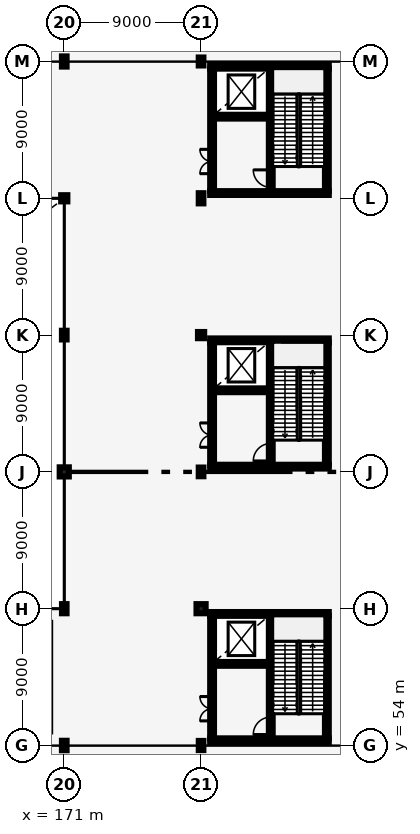
"""IFC4 building model, lengths in metres.
Left out: names, types, materials, properties, quantities, classifications, styles, units other than length and angle.
Written with IfcOpenShell. Run it as: python <this file> out.ifc"""

import sys

from ifc_helpers import new_model, si_unit, direction, frame, frame_2d, origin, origin_2d, place, context, subcontext, project, spatial, rectangle, hollow_circle, i_section, extrude, element, fill, save


model = new_model("IFC4")
c1 = context("Model", 3, precision=1e-05, world=origin(), true_north=direction((0.0, 1.0)))
c2 = subcontext(c1, "Body", "Model", "MODEL_VIEW")
j1 = project(units=[si_unit("LENGTHUNIT", "METRE"), si_unit("PLANEANGLEUNIT", "RADIAN")], contexts=[c1])
p1 = place(None, origin())
s1 = spatial("IfcSite", under=j1, at=p1, CompositionType="ELEMENT")
p2 = place(p1, origin())
s2 = spatial("IfcBuilding", under=s1, at=p2, CompositionType="ELEMENT")
p3 = place(p2, frame((0.0, 0.0, 6.0)))
s3 = spatial("IfcBuildingStorey", under=s2, at=p3, CompositionType="ELEMENT", Elevation=6.0)
p4 = place(p3, frame((171.0, 54.0, 0.0), z_axis=(0.0, 0.0, 1.0), x_axis=(1.0, 0.0, 0.0)))
e1 = element("IfcColumn", 1, at=p4, inside=s3, PredefinedType="COLUMN", context=c2, shape_type="SweptSolid", body=[
    extrude(i_section(OverallWidth=0.305, OverallDepth=0.62, WebThickness=0.021, FlangeThickness=0.04, FilletRadius=0.027, at=origin_2d()), origin(), (0.0, 0.0, 1.0), 6.0),
])
p5 = place(p3, frame((171.0, 63.0, 0.0), z_axis=(0.0, 0.0, 1.0), x_axis=(1.0, 0.0, 0.0)))
e2 = element("IfcColumn", 2, at=p5, inside=s3, PredefinedType="COLUMN", context=c2, shape_type="SweptSolid", body=[
    extrude(i_section(OverallWidth=0.3, OverallDepth=0.6, WebThickness=0.015, FlangeThickness=0.03, FilletRadius=0.027, at=origin_2d()), origin(), (0.0, 0.0, 1.0), 6.0),
])
p6 = place(p3, frame((171.0, 72.0, 0.0), z_axis=(0.0, 0.0, 1.0), x_axis=(1.0, 0.0, 0.0)))
e3 = element("IfcColumn", 3, at=p6, inside=s3, PredefinedType="COLUMN", context=c2, shape_type="SweptSolid", body=[
    extrude(rectangle(XDim=0.6, YDim=0.6, at=origin_2d()), origin(), (0.0, 0.0, 1.0), 6.0),
])
p7 = place(p3, frame((171.0, 81.0, 0.0), z_axis=(0.0, 0.0, 1.0), x_axis=(1.0, 0.0, 0.0)))
e4 = element("IfcColumn", 4, at=p7, inside=s3, PredefinedType="COLUMN", context=c2, shape_type="SweptSolid", body=[
    extrude(i_section(OverallWidth=0.306, OverallDepth=0.572, WebThickness=0.021, FlangeThickness=0.04, FilletRadius=0.027, at=origin_2d()), origin(), (0.0, 0.0, 1.0), 6.0),
])
p8 = place(p3, frame((171.0, 90.0, 0.0), z_axis=(0.0, 0.0, 1.0), x_axis=(1.0, 0.0, 0.0)))
e5 = element("IfcColumn", 5, at=p8, inside=s3, PredefinedType="COLUMN", context=c2, shape_type="SweptSolid", body=[
    extrude(hollow_circle(Radius=0.203, WallThickness=0.016, at=origin_2d()), origin(), (0.0, 0.0, 1.0), 6.0),
])
p9 = place(p3, frame((171.0, 99.0, 0.0), z_axis=(0.0, 0.0, 1.0), x_axis=(1.0, 0.0, 0.0)))
e6 = element("IfcColumn", 6, at=p9, inside=s3, PredefinedType="COLUMN", context=c2, shape_type="SweptSolid", body=[
    extrude(i_section(OverallWidth=0.305, OverallDepth=0.668, WebThickness=0.021, FlangeThickness=0.04, FilletRadius=0.027, at=origin_2d()), origin(), (0.0, 0.0, 1.0), 6.0),
])
p10 = place(p3, frame((180.0, 54.0, 0.0), z_axis=(0.0, 0.0, 1.0), x_axis=(1.0, 0.0, 0.0)))
e7 = element("IfcColumn", 7, at=p10, inside=s3, PredefinedType="COLUMN", context=c2, shape_type="SweptSolid", body=[
    extrude(i_section(OverallWidth=0.3, OverallDepth=0.6, WebThickness=0.015, FlangeThickness=0.03, FilletRadius=0.027, at=origin_2d()), origin(), (0.0, 0.0, 1.0), 6.0),
])
p11 = place(p3, frame((180.0, 63.0, 0.0), z_axis=(0.0, 0.0, 1.0), x_axis=(1.0, 0.0, 0.0)))
e8 = element("IfcColumn", 8, at=p11, inside=s3, PredefinedType="COLUMN", context=c2, shape_type="SweptSolid", body=[
    extrude(rectangle(XDim=0.6, YDim=0.6, at=origin_2d()), origin(), (0.0, 0.0, 1.0), 6.0),
])
p12 = place(p3, frame((180.0, 72.0, 0.0), z_axis=(0.0, 0.0, 1.0), x_axis=(1.0, 0.0, 0.0)))
e9 = element("IfcColumn", 9, at=p12, inside=s3, PredefinedType="COLUMN", context=c2, shape_type="SweptSolid", body=[
    extrude(i_section(OverallWidth=0.306, OverallDepth=0.572, WebThickness=0.021, FlangeThickness=0.04, FilletRadius=0.027, at=origin_2d()), origin(), (0.0, 0.0, 1.0), 6.0),
])
p13 = place(p3, frame((180.0, 81.0, 0.0), z_axis=(0.0, 0.0, 1.0), x_axis=(1.0, 0.0, 0.0)))
e10 = element("IfcColumn", 10, at=p13, inside=s3, PredefinedType="COLUMN", context=c2, shape_type="SweptSolid", body=[
    extrude(hollow_circle(Radius=0.203, WallThickness=0.016, at=origin_2d()), origin(), (0.0, 0.0, 1.0), 6.0),
])
p14 = place(p3, frame((180.0, 90.0, 0.0), z_axis=(0.0, 0.0, 1.0), x_axis=(1.0, 0.0, 0.0)))
e11 = element("IfcColumn", 11, at=p14, inside=s3, PredefinedType="COLUMN", context=c2, shape_type="SweptSolid", body=[
    extrude(i_section(OverallWidth=0.305, OverallDepth=0.668, WebThickness=0.021, FlangeThickness=0.04, FilletRadius=0.027, at=origin_2d()), origin(), (0.0, 0.0, 1.0), 6.0),
])
p15 = place(p3, frame((180.0, 99.0, 0.0), z_axis=(0.0, 0.0, 1.0), x_axis=(1.0, 0.0, 0.0)))
e12 = element("IfcColumn", 12, at=p15, inside=s3, PredefinedType="COLUMN", context=c2, shape_type="SweptSolid", body=[
    extrude(i_section(OverallWidth=0.306, OverallDepth=0.524, WebThickness=0.021, FlangeThickness=0.04, FilletRadius=0.027, at=origin_2d()), origin(), (0.0, 0.0, 1.0), 6.0),
])
p16 = place(p3, frame((180.725, 54.47, 0.0), z_axis=(0.0, 0.0, 1.0), x_axis=(0.0, 1.0, 0.0)))
e13 = element("IfcWall", 13, at=p16, inside=s3, PredefinedType="SHEAR", context=c2, shape_type="SweptSolid", body=[
    extrude(rectangle(XDim=8.06, YDim=0.25, at=frame_2d((4.03, 0.0))), origin(), (0.0, 0.0, 1.0), 5.64),
])
p17 = place(p16, frame((1.15, 0.0, 0.0)))
e14 = element("IfcOpeningElement", 14, at=p17, cuts=e13, PredefinedType="OPENING", context=c2, shape_type="SweptSolid", body=[
    extrude(rectangle(XDim=1.6, YDim=2.2, at=frame_2d((0.8, 1.1))), frame((0.0, 0.135, 0.0), z_axis=(0.0, -1.0, 0.0), x_axis=(1.0, 0.0, 0.0)), (0.0, 0.0, 1.0), 0.27),
])
p18 = place(p3, frame((188.275, 54.47, 0.0), z_axis=(0.0, 0.0, 1.0), x_axis=(0.0, 1.0, 0.0)))
e15 = element("IfcWall", 15, at=p18, inside=s3, PredefinedType="SHEAR", context=c2, shape_type="SweptSolid", body=[
    extrude(rectangle(XDim=8.06, YDim=0.25, at=frame_2d((4.03, 0.0))), origin(), (0.0, 0.0, 1.0), 5.64),
])
for number, where, z_axis, x_axis in (
    (16, (180.6, 54.345, 0.0), (0.0, 0.0, 1.0), (1.0, 0.0, 0.0)),
    (17, (180.6, 62.655, 0.0), (0.0, 0.0, 1.0), (1.0, 0.0, 0.0)),
):
    element("IfcWall", number, at=place(p3, frame(where, z_axis=z_axis, x_axis=x_axis)), inside=s3, PredefinedType="SHEAR", context=c2, shape_type="SweptSolid", body=[
        extrude(rectangle(XDim=7.8, YDim=0.25, at=frame_2d((3.9, 0.0))), origin(), (0.0, 0.0, 1.0), 5.64),
    ])
p19 = place(p3, frame((184.585, 54.47, 0.0), z_axis=(0.0, 0.0, 1.0), x_axis=(0.0, 1.0, 0.0)))
e18 = element("IfcWall", 18, at=p19, inside=s3, PredefinedType="SHEAR", context=c2, shape_type="SweptSolid", body=[
    extrude(rectangle(XDim=8.06, YDim=0.25, at=frame_2d((4.03, 0.0))), origin(), (0.0, 0.0, 1.0), 5.64),
])
p20 = place(p19, frame((0.25, 0.0, 0.0)))
e19 = element("IfcOpeningElement", 19, at=p20, cuts=e18, PredefinedType="OPENING", context=c2, shape_type="SweptSolid", body=[
    extrude(rectangle(XDim=1.15, YDim=2.15, at=frame_2d((0.575, 1.075))), frame((0.0, 0.135, 0.0), z_axis=(0.0, -1.0, 0.0), x_axis=(1.0, 0.0, 0.0)), (0.0, 0.0, 1.0), 0.27),
])
p21 = place(p3, frame((180.85, 59.37, 0.0), z_axis=(0.0, 0.0, 1.0), x_axis=(1.0, 0.0, 0.0)))
e20 = element("IfcWall", 20, at=p21, inside=s3, PredefinedType="SHEAR", context=c2, shape_type="SweptSolid", body=[
    extrude(rectangle(XDim=3.61, YDim=0.25, at=frame_2d((1.805, 0.0))), origin(), (0.0, 0.0, 1.0), 5.64),
])
p22 = place(p21, frame((0.95, 0.0, 0.0)))
e21 = element("IfcOpeningElement", 21, at=p22, cuts=e20, PredefinedType="OPENING", context=c2, shape_type="SweptSolid", body=[
    extrude(rectangle(XDim=1.2, YDim=2.2, at=frame_2d((0.6, 1.1))), frame((0.0, 0.135, 0.0), z_axis=(0.0, -1.0, 0.0), x_axis=(1.0, 0.0, 0.0)), (0.0, 0.0, 1.0), 0.27),
])
p23 = place(p3, frame((180.725, 72.47, 0.0), z_axis=(0.0, 0.0, 1.0), x_axis=(0.0, 1.0, 0.0)))
e22 = element("IfcWall", 22, at=p23, inside=s3, PredefinedType="SHEAR", context=c2, shape_type="SweptSolid", body=[
    extrude(rectangle(XDim=8.06, YDim=0.25, at=frame_2d((4.03, 0.0))), origin(), (0.0, 0.0, 1.0), 5.64),
])
p24 = place(p23, frame((1.15, 0.0, 0.0)))
e23 = element("IfcOpeningElement", 23, at=p24, cuts=e22, PredefinedType="OPENING", context=c2, shape_type="SweptSolid", body=[
    extrude(rectangle(XDim=1.6, YDim=2.2, at=frame_2d((0.8, 1.1))), frame((0.0, 0.135, 0.0), z_axis=(0.0, -1.0, 0.0), x_axis=(1.0, 0.0, 0.0)), (0.0, 0.0, 1.0), 0.27),
])
p25 = place(p3, frame((188.275, 72.47, 0.0), z_axis=(0.0, 0.0, 1.0), x_axis=(0.0, 1.0, 0.0)))
e24 = element("IfcWall", 24, at=p25, inside=s3, PredefinedType="SHEAR", context=c2, shape_type="SweptSolid", body=[
    extrude(rectangle(XDim=8.06, YDim=0.25, at=frame_2d((4.03, 0.0))), origin(), (0.0, 0.0, 1.0), 5.64),
])
for number, where, z_axis, x_axis in (
    (25, (180.6, 72.345, 0.0), (0.0, 0.0, 1.0), (1.0, 0.0, 0.0)),
    (26, (180.6, 80.655, 0.0), (0.0, 0.0, 1.0), (1.0, 0.0, 0.0)),
):
    element("IfcWall", number, at=place(p3, frame(where, z_axis=z_axis, x_axis=x_axis)), inside=s3, PredefinedType="SHEAR", context=c2, shape_type="SweptSolid", body=[
        extrude(rectangle(XDim=7.8, YDim=0.25, at=frame_2d((3.9, 0.0))), origin(), (0.0, 0.0, 1.0), 5.64),
    ])
p26 = place(p3, frame((184.585, 72.47, 0.0), z_axis=(0.0, 0.0, 1.0), x_axis=(0.0, 1.0, 0.0)))
e27 = element("IfcWall", 27, at=p26, inside=s3, PredefinedType="SHEAR", context=c2, shape_type="SweptSolid", body=[
    extrude(rectangle(XDim=8.06, YDim=0.25, at=frame_2d((4.03, 0.0))), origin(), (0.0, 0.0, 1.0), 5.64),
])
p27 = place(p26, frame((0.25, 0.0, 0.0)))
e28 = element("IfcOpeningElement", 28, at=p27, cuts=e27, PredefinedType="OPENING", context=c2, shape_type="SweptSolid", body=[
    extrude(rectangle(XDim=1.15, YDim=2.15, at=frame_2d((0.575, 1.075))), frame((0.0, 0.135, 0.0), z_axis=(0.0, -1.0, 0.0), x_axis=(1.0, 0.0, 0.0)), (0.0, 0.0, 1.0), 0.27),
])
p28 = place(p3, frame((180.85, 77.37, 0.0), z_axis=(0.0, 0.0, 1.0), x_axis=(1.0, 0.0, 0.0)))
e29 = element("IfcWall", 29, at=p28, inside=s3, PredefinedType="SHEAR", context=c2, shape_type="SweptSolid", body=[
    extrude(rectangle(XDim=3.61, YDim=0.25, at=frame_2d((1.805, 0.0))), origin(), (0.0, 0.0, 1.0), 5.64),
])
p29 = place(p28, frame((0.95, 0.0, 0.0)))
e30 = element("IfcOpeningElement", 30, at=p29, cuts=e29, PredefinedType="OPENING", context=c2, shape_type="SweptSolid", body=[
    extrude(rectangle(XDim=1.2, YDim=2.2, at=frame_2d((0.6, 1.1))), frame((0.0, 0.135, 0.0), z_axis=(0.0, -1.0, 0.0), x_axis=(1.0, 0.0, 0.0)), (0.0, 0.0, 1.0), 0.27),
])
p30 = place(p3, frame((180.725, 90.47, 0.0), z_axis=(0.0, 0.0, 1.0), x_axis=(0.0, 1.0, 0.0)))
e31 = element("IfcWall", 31, at=p30, inside=s3, PredefinedType="SHEAR", context=c2, shape_type="SweptSolid", body=[
    extrude(rectangle(XDim=8.06, YDim=0.25, at=frame_2d((4.03, 0.0))), origin(), (0.0, 0.0, 1.0), 5.64),
])
p31 = place(p30, frame((1.15, 0.0, 0.0)))
e32 = element("IfcOpeningElement", 32, at=p31, cuts=e31, PredefinedType="OPENING", context=c2, shape_type="SweptSolid", body=[
    extrude(rectangle(XDim=1.6, YDim=2.2, at=frame_2d((0.8, 1.1))), frame((0.0, 0.135, 0.0), z_axis=(0.0, -1.0, 0.0), x_axis=(1.0, 0.0, 0.0)), (0.0, 0.0, 1.0), 0.27),
])
p32 = place(p3, frame((188.275, 90.47, 0.0), z_axis=(0.0, 0.0, 1.0), x_axis=(0.0, 1.0, 0.0)))
e33 = element("IfcWall", 33, at=p32, inside=s3, PredefinedType="SHEAR", context=c2, shape_type="SweptSolid", body=[
    extrude(rectangle(XDim=8.06, YDim=0.25, at=frame_2d((4.03, 0.0))), origin(), (0.0, 0.0, 1.0), 5.64),
])
for number, where, z_axis, x_axis in (
    (34, (180.6, 90.345, 0.0), (0.0, 0.0, 1.0), (1.0, 0.0, 0.0)),
    (35, (180.6, 98.655, 0.0), (0.0, 0.0, 1.0), (1.0, 0.0, 0.0)),
):
    element("IfcWall", number, at=place(p3, frame(where, z_axis=z_axis, x_axis=x_axis)), inside=s3, PredefinedType="SHEAR", context=c2, shape_type="SweptSolid", body=[
        extrude(rectangle(XDim=7.8, YDim=0.25, at=frame_2d((3.9, 0.0))), origin(), (0.0, 0.0, 1.0), 5.64),
    ])
p33 = place(p3, frame((184.585, 90.47, 0.0), z_axis=(0.0, 0.0, 1.0), x_axis=(0.0, 1.0, 0.0)))
e36 = element("IfcWall", 36, at=p33, inside=s3, PredefinedType="SHEAR", context=c2, shape_type="SweptSolid", body=[
    extrude(rectangle(XDim=8.06, YDim=0.25, at=frame_2d((4.03, 0.0))), origin(), (0.0, 0.0, 1.0), 5.64),
])
p34 = place(p33, frame((0.25, 0.0, 0.0)))
e37 = element("IfcOpeningElement", 37, at=p34, cuts=e36, PredefinedType="OPENING", context=c2, shape_type="SweptSolid", body=[
    extrude(rectangle(XDim=1.15, YDim=2.15, at=frame_2d((0.575, 1.075))), frame((0.0, 0.135, 0.0), z_axis=(0.0, -1.0, 0.0), x_axis=(1.0, 0.0, 0.0)), (0.0, 0.0, 1.0), 0.27),
])
p35 = place(p3, frame((180.85, 95.37, 0.0), z_axis=(0.0, 0.0, 1.0), x_axis=(1.0, 0.0, 0.0)))
e38 = element("IfcWall", 38, at=p35, inside=s3, PredefinedType="SHEAR", context=c2, shape_type="SweptSolid", body=[
    extrude(rectangle(XDim=3.61, YDim=0.25, at=frame_2d((1.805, 0.0))), origin(), (0.0, 0.0, 1.0), 5.64),
])
p36 = place(p35, frame((0.95, 0.0, 0.0)))
e39 = element("IfcOpeningElement", 39, at=p36, cuts=e38, PredefinedType="OPENING", context=c2, shape_type="SweptSolid", body=[
    extrude(rectangle(XDim=1.2, YDim=2.2, at=frame_2d((0.6, 1.1))), frame((0.0, 0.135, 0.0), z_axis=(0.0, -1.0, 0.0), x_axis=(1.0, 0.0, 0.0)), (0.0, 0.0, 1.0), 0.27),
])
p37 = place(p20, origin())
e40 = element("IfcDoor", 40, at=p37, inside=s3, OperationType="SINGLE_SWING_LEFT", PredefinedType="DOOR", context=c2, shape_type="SweptSolid", body=[
    extrude(rectangle(XDim=1.15, YDim=2.15, at=frame_2d((0.575, 1.075))), frame((0.0, 0.025, 0.0), z_axis=(0.0, -1.0, 0.0), x_axis=(1.0, 0.0, 0.0)), (0.0, 0.0, 1.0), 0.05),
])
fill(e19, e40)
p38 = place(p22, origin())
e41 = element("IfcDoor", 41, at=p38, inside=s3, OperationType="DOUBLE_DOOR_SLIDING", PredefinedType="DOOR", context=c2, shape_type="SweptSolid", body=[
    extrude(rectangle(XDim=1.2, YDim=2.2, at=frame_2d((0.6, 1.1))), frame((0.0, 0.025, 0.0), z_axis=(0.0, -1.0, 0.0), x_axis=(1.0, 0.0, 0.0)), (0.0, 0.0, 1.0), 0.05),
])
fill(e21, e41)
p39 = place(p17, origin())
e42 = element("IfcDoor", 42, at=p39, inside=s3, OperationType="DOUBLE_DOOR_SINGLE_SWING", PredefinedType="DOOR", context=c2, shape_type="SweptSolid", body=[
    extrude(rectangle(XDim=1.6, YDim=2.2, at=frame_2d((0.8, 1.1))), frame((0.0, 0.025, 0.0), z_axis=(0.0, -1.0, 0.0), x_axis=(1.0, 0.0, 0.0)), (0.0, 0.0, 1.0), 0.05),
])
fill(e14, e42)
p40 = place(p27, origin())
e43 = element("IfcDoor", 43, at=p40, inside=s3, OperationType="SINGLE_SWING_LEFT", PredefinedType="DOOR", context=c2, shape_type="SweptSolid", body=[
    extrude(rectangle(XDim=1.15, YDim=2.15, at=frame_2d((0.575, 1.075))), frame((0.0, 0.025, 0.0), z_axis=(0.0, -1.0, 0.0), x_axis=(1.0, 0.0, 0.0)), (0.0, 0.0, 1.0), 0.05),
])
fill(e28, e43)
p41 = place(p29, origin())
e44 = element("IfcDoor", 44, at=p41, inside=s3, OperationType="DOUBLE_DOOR_SLIDING", PredefinedType="DOOR", context=c2, shape_type="SweptSolid", body=[
    extrude(rectangle(XDim=1.2, YDim=2.2, at=frame_2d((0.6, 1.1))), frame((0.0, 0.025, 0.0), z_axis=(0.0, -1.0, 0.0), x_axis=(1.0, 0.0, 0.0)), (0.0, 0.0, 1.0), 0.05),
])
fill(e30, e44)
p42 = place(p24, origin())
e45 = element("IfcDoor", 45, at=p42, inside=s3, OperationType="DOUBLE_DOOR_SINGLE_SWING", PredefinedType="DOOR", context=c2, shape_type="SweptSolid", body=[
    extrude(rectangle(XDim=1.6, YDim=2.2, at=frame_2d((0.8, 1.1))), frame((0.0, 0.025, 0.0), z_axis=(0.0, -1.0, 0.0), x_axis=(1.0, 0.0, 0.0)), (0.0, 0.0, 1.0), 0.05),
])
fill(e23, e45)
p43 = place(p34, origin())
e46 = element("IfcDoor", 46, at=p43, inside=s3, OperationType="SINGLE_SWING_RIGHT", PredefinedType="DOOR", context=c2, shape_type="SweptSolid", body=[
    extrude(rectangle(XDim=1.15, YDim=2.15, at=frame_2d((0.575, 1.075))), frame((0.0, 0.025, 0.0), z_axis=(0.0, -1.0, 0.0), x_axis=(1.0, 0.0, 0.0)), (0.0, 0.0, 1.0), 0.05),
])
fill(e37, e46)
p44 = place(p36, origin())
e47 = element("IfcDoor", 47, at=p44, inside=s3, OperationType="DOUBLE_DOOR_SLIDING", PredefinedType="DOOR", context=c2, shape_type="SweptSolid", body=[
    extrude(rectangle(XDim=1.2, YDim=2.2, at=frame_2d((0.6, 1.1))), frame((0.0, 0.025, 0.0), z_axis=(0.0, -1.0, 0.0), x_axis=(1.0, 0.0, 0.0)), (0.0, 0.0, 1.0), 0.05),
])
fill(e39, e47)
p45 = place(p31, origin())
e48 = element("IfcDoor", 48, at=p45, inside=s3, OperationType="DOUBLE_DOOR_SINGLE_SWING", PredefinedType="DOOR", context=c2, shape_type="SweptSolid", body=[
    extrude(rectangle(XDim=1.6, YDim=2.2, at=frame_2d((0.8, 1.1))), frame((0.0, 0.025, 0.0), z_axis=(0.0, -1.0, 0.0), x_axis=(1.0, 0.0, 0.0)), (0.0, 0.0, 1.0), 0.05),
])
fill(e32, e48)
save(model, sys.argv[1])
